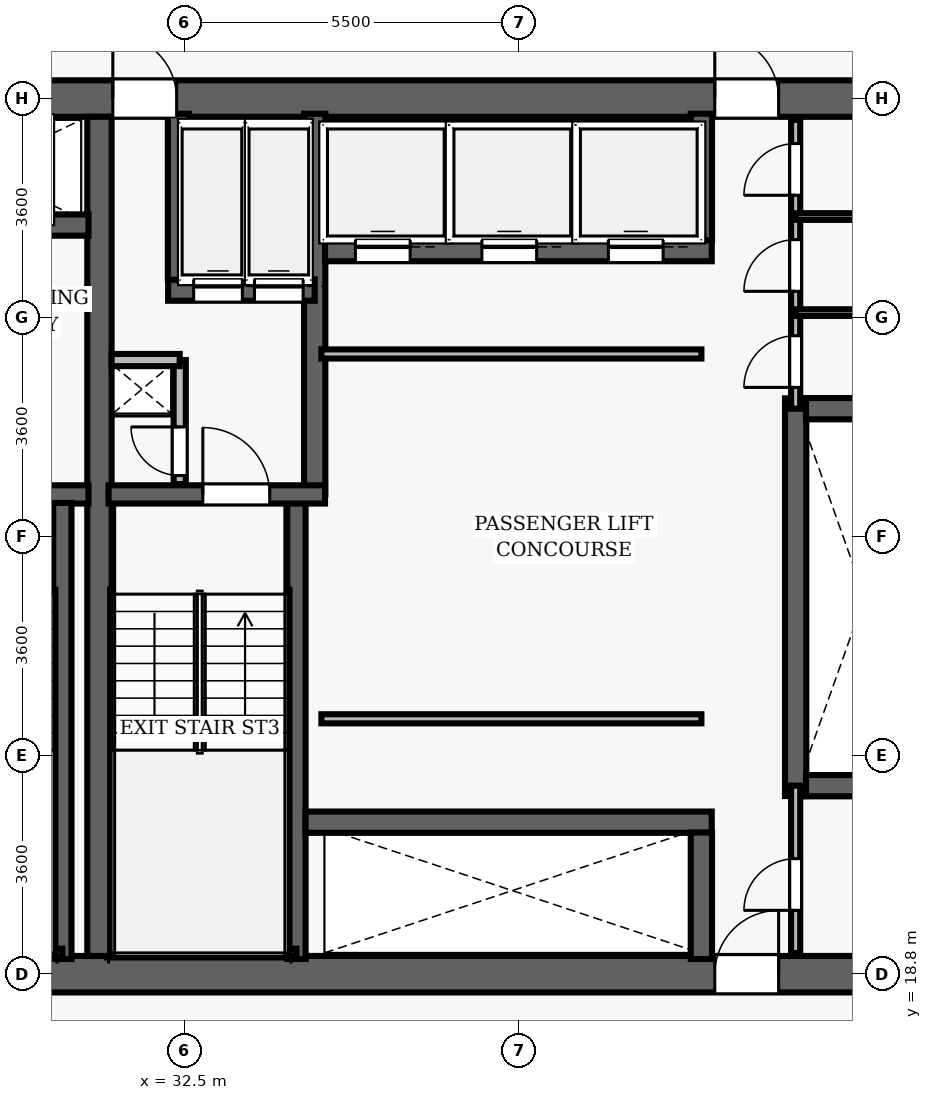
"""IFC4 building model, lengths in metres.
Left out: names, types, materials, properties, quantities, classifications, styles, units other than length and angle.
Written with IfcOpenShell. Run it as: python <this file> out.ifc"""

import sys

from ifc_helpers import new_model, si_unit, direction, frame, frame_2d, origin, place, context, subcontext, project, spatial, rectangle, extrude, element, fill, save


model = new_model("IFC4")
c1 = context("Model", 3, precision=1e-05, world=origin(), true_north=direction((0.0, 1.0)))
c2 = subcontext(c1, "Body", "Model", "MODEL_VIEW")
j1 = project(units=[si_unit("LENGTHUNIT", "METRE"), si_unit("PLANEANGLEUNIT", "RADIAN")], contexts=[c1])
p1 = place(None, origin())
s1 = spatial("IfcSite", under=j1, at=p1, CompositionType="ELEMENT")
p2 = place(p1, origin())
s2 = spatial("IfcBuilding", under=s1, at=p2, CompositionType="ELEMENT")
p3 = place(p2, frame((0.0, 0.0, 55.4)))
s3 = spatial("IfcBuildingStorey", under=s2, at=p3, CompositionType="ELEMENT", Elevation=55.4)
p4 = place(p3, frame((26.7, 18.8, 0.0), z_axis=(0.0, 0.0, 1.0), x_axis=(1.0, 0.0, 0.0)))
e1 = element("IfcWall", 1, at=p4, inside=s3, PredefinedType="SHEAR", context=c2, shape_type="SweptSolid", body=[
    extrude(rectangle(XDim=22.6, YDim=0.6, at=frame_2d((11.3, 0.0))), origin(), (0.0, 0.0, 1.0), 3.5),
])
p5 = place(p4, frame((14.52, 0.0, 0.0)))
e2 = element("IfcOpeningElement", 2, at=p5, cuts=e1, PredefinedType="OPENING", context=c2, shape_type="SweptSolid", body=[
    extrude(rectangle(XDim=1.05, YDim=2.15, at=frame_2d((0.525, 1.075))), frame((0.0, 0.31, 0.0), z_axis=(0.0, -1.0, 0.0), x_axis=(1.0, 0.0, 0.0)), (0.0, 0.0, 1.0), 0.62),
])
p6 = place(p3, frame((26.7, 33.2, 0.0), z_axis=(0.0, 0.0, 1.0), x_axis=(1.0, 0.0, 0.0)))
e3 = element("IfcWall", 3, at=p6, inside=s3, PredefinedType="SHEAR", context=c2, shape_type="SweptSolid", body=[
    extrude(rectangle(XDim=22.6, YDim=0.6, at=frame_2d((11.3, 0.0))), origin(), (0.0, 0.0, 1.0), 3.5),
])
p7 = place(p6, frame((4.62, 0.0, 0.0)))
e4 = element("IfcOpeningElement", 4, at=p7, cuts=e3, PredefinedType="OPENING", context=c2, shape_type="SweptSolid", body=[
    extrude(rectangle(XDim=1.05, YDim=2.15, at=frame_2d((0.525, 1.075))), frame((0.0, 0.31, 0.0), z_axis=(0.0, -1.0, 0.0), x_axis=(1.0, 0.0, 0.0)), (0.0, 0.0, 1.0), 0.62),
])
p8 = place(p6, frame((14.52, 0.0, 0.0)))
e5 = element("IfcOpeningElement", 5, at=p8, cuts=e3, PredefinedType="OPENING", context=c2, shape_type="SweptSolid", body=[
    extrude(rectangle(XDim=1.05, YDim=2.15, at=frame_2d((0.525, 1.075))), frame((0.0, 0.31, 0.0), z_axis=(0.0, -1.0, 0.0), x_axis=(1.0, 0.0, 0.0)), (0.0, 0.0, 1.0), 0.62),
])
p9 = place(p3, frame((31.1, 19.1, 0.0), z_axis=(0.0, 0.0, 1.0), x_axis=(0.0, 1.0, 0.0)))
e6 = element("IfcWall", 6, at=p9, inside=s3, PredefinedType="SHEAR", context=c2, shape_type="SweptSolid", body=[
    extrude(rectangle(XDim=13.8, YDim=0.4, at=frame_2d((6.9, 0.0))), origin(), (0.0, 0.0, 1.0), 3.5),
])
p10 = place(p3, frame((27.25, 26.69, 0.0), z_axis=(0.0, 0.0, 1.0), x_axis=(1.0, 0.0, 0.0)))
e7 = element("IfcWall", 7, at=p10, inside=s3, PredefinedType="SHEAR", context=c2, shape_type="SweptSolid", body=[
    extrude(rectangle(XDim=3.67, YDim=0.3, at=frame_2d((1.835, 0.0))), origin(), (0.0, 0.0, 1.0), 3.5),
])
p11 = place(p10, frame((1.05, 0.0, 0.0)))
e8 = element("IfcOpeningElement", 8, at=p11, cuts=e7, PredefinedType="OPENING", context=c2, shape_type="SweptSolid", body=[
    extrude(rectangle(XDim=1.1, YDim=2.15, at=frame_2d((0.55, 1.075))), frame((0.0, 0.16, 0.0), z_axis=(0.0, -1.0, 0.0), x_axis=(1.0, 0.0, 0.0)), (0.0, 0.0, 1.0), 0.32),
])
p12 = place(p3, frame((30.49, 19.05, 0.0), z_axis=(0.0, 0.0, 1.0), x_axis=(0.0, 1.0, 0.0)))
e9 = element("IfcWall", 9, at=p12, inside=s3, PredefinedType="SHEAR", context=c2, shape_type="SweptSolid", body=[
    extrude(rectangle(XDim=7.5, YDim=0.3, at=frame_2d((3.75, 0.0))), origin(), (0.0, 0.0, 1.0), 3.5),
])
p13 = place(p3, frame((27.395, 19.16, 0.0), z_axis=(0.0, 0.0, 1.0), x_axis=(1.0, 0.0, 0.0)))
e10 = element("IfcWall", 10, at=p13, inside=s3, PredefinedType="SHEAR", context=c2, shape_type="SweptSolid", body=[
    extrude(rectangle(XDim=3.095, YDim=0.12, at=frame_2d((1.547, 0.0))), origin(), (0.0, 0.0, 1.0), 3.5),
])
p14 = place(p3, frame((27.25, 31.12, 0.0), z_axis=(0.0, 0.0, 1.0), x_axis=(1.0, 0.0, 0.0)))
e11 = element("IfcWall", 11, at=p14, inside=s3, PredefinedType="SHEAR", context=c2, shape_type="SweptSolid", body=[
    extrude(rectangle(XDim=3.67, YDim=0.35, at=frame_2d((1.835, 0.0))), origin(), (0.0, 0.0, 1.0), 2.6),
])
p15 = place(p14, frame((1.25, 0.0, 0.0)))
e12 = element("IfcOpeningElement", 12, at=p15, cuts=e11, PredefinedType="OPENING", context=c2, shape_type="SweptSolid", body=[
    extrude(rectangle(XDim=1.1, YDim=2.15, at=frame_2d((0.55, 1.075))), frame((0.0, 0.185, 0.0), z_axis=(0.0, -1.0, 0.0), x_axis=(1.0, 0.0, 0.0)), (0.0, 0.0, 1.0), 0.37),
])
p16 = place(p3, frame((34.34, 19.05, 0.0), z_axis=(0.0, 0.0, 1.0), x_axis=(0.0, 1.0, 0.0)))
e13 = element("IfcWall", 13, at=p16, inside=s3, PredefinedType="SHEAR", context=c2, shape_type="SweptSolid", body=[
    extrude(rectangle(XDim=7.5, YDim=0.3, at=frame_2d((3.75, 0.0))), origin(), (0.0, 0.0, 1.0), 3.5),
])
p17 = place(p3, frame((34.64, 26.69, 0.0), z_axis=(0.0, 0.0, 1.0), x_axis=(0.0, 1.0, 0.0)))
e14 = element("IfcWall", 14, at=p17, inside=s3, PredefinedType="SHEAR", context=c2, shape_type="SweptSolid", body=[
    extrude(rectangle(XDim=6.26, YDim=0.35, at=frame_2d((3.13, 0.0))), origin(), (0.0, 0.0, 1.0), 3.5),
])
p18 = place(p3, frame((31.25, 26.69, 0.0), z_axis=(0.0, 0.0, 1.0), x_axis=(1.0, 0.0, 0.0)))
e15 = element("IfcWall", 15, at=p18, inside=s3, PredefinedType="SHEAR", context=c2, shape_type="SweptSolid", body=[
    extrude(rectangle(XDim=3.56, YDim=0.3, at=frame_2d((1.78, 0.0))), origin(), (0.0, 0.0, 1.0), 3.5),
])
p19 = place(p18, frame((1.55, 0.0, 0.0)))
e16 = element("IfcOpeningElement", 16, at=p19, cuts=e15, PredefinedType="OPENING", context=c2, shape_type="SweptSolid", body=[
    extrude(rectangle(XDim=1.1, YDim=2.15, at=frame_2d((0.55, 1.075))), frame((0.0, 0.16, 0.0), z_axis=(0.0, -1.0, 0.0), x_axis=(1.0, 0.0, 0.0)), (0.0, 0.0, 1.0), 0.32),
])
p20 = place(p3, frame((31.3, 19.16, 0.0), z_axis=(0.0, 0.0, 1.0), x_axis=(1.0, 0.0, 0.0)))
e17 = element("IfcWall", 17, at=p20, inside=s3, PredefinedType="SHEAR", context=c2, shape_type="SweptSolid", body=[
    extrude(rectangle(XDim=3.04, YDim=0.12, at=frame_2d((1.52, 0.0))), origin(), (0.0, 0.0, 1.0), 3.5),
])
p21 = place(p3, frame((32.23, 30.05, 0.0), z_axis=(0.0, 0.0, 1.0), x_axis=(1.0, 0.0, 0.0)))
e18 = element("IfcWall", 18, at=p21, inside=s3, PredefinedType="SHEAR", context=c2, shape_type="SweptSolid", body=[
    extrude(rectangle(XDim=2.41, YDim=0.35, at=frame_2d((1.205, 0.0))), origin(), (0.0, 0.0, 1.0), 2.6),
])
p22 = place(p21, frame((0.42, 0.0, 0.0)))
e19 = element("IfcOpeningElement", 19, at=p22, cuts=e18, PredefinedType="OPENING", context=c2, shape_type="SweptSolid", body=[
    extrude(rectangle(XDim=0.8, YDim=2.15, at=frame_2d((0.4, 1.075))), frame((0.0, 0.185, 0.0), z_axis=(0.0, -1.0, 0.0), x_axis=(1.0, 0.0, 0.0)), (0.0, 0.0, 1.0), 0.37),
])
p23 = place(p21, frame((1.42, 0.0, 0.0)))
e20 = element("IfcOpeningElement", 20, at=p23, cuts=e18, PredefinedType="OPENING", context=c2, shape_type="SweptSolid", body=[
    extrude(rectangle(XDim=0.8, YDim=2.15, at=frame_2d((0.4, 1.075))), frame((0.0, 0.185, 0.0), z_axis=(0.0, -1.0, 0.0), x_axis=(1.0, 0.0, 0.0)), (0.0, 0.0, 1.0), 0.37),
])
p24 = place(p3, frame((32.4, 30.22, 0.0), z_axis=(0.0, 0.0, 1.0), x_axis=(0.0, 1.0, 0.0)))
e21 = element("IfcWall", 21, at=p24, inside=s3, PredefinedType="SHEAR", context=c2, shape_type="SweptSolid", body=[
    extrude(rectangle(XDim=2.73, YDim=0.35, at=frame_2d((1.365, 0.0))), origin(), (0.0, 0.0, 1.0), 2.6),
])
p25 = place(p3, frame((32.42, 26.86, 0.0), z_axis=(0.0, 0.0, 1.0), x_axis=(0.0, 1.0, 0.0)))
e22 = element("IfcWall", 22, at=p25, inside=s3, PredefinedType="PARTITIONING", context=c2, shape_type="SweptSolid", body=[
    extrude(rectangle(XDim=2.04, YDim=0.2, at=frame_2d((1.02, 0.0))), origin(), (0.0, 0.0, 1.0), 2.6),
])
p26 = place(p25, frame((0.14, 0.0, 0.0)))
e23 = element("IfcOpeningElement", 23, at=p26, cuts=e22, PredefinedType="OPENING", context=c2, shape_type="SweptSolid", body=[
    extrude(rectangle(XDim=0.8, YDim=2.05, at=frame_2d((0.4, 1.025))), frame((0.0, 0.11, 0.0), z_axis=(0.0, -1.0, 0.0), x_axis=(1.0, 0.0, 0.0)), (0.0, 0.0, 1.0), 0.22),
])
p27 = place(p3, frame((31.3, 28.9, 0.0), z_axis=(0.0, 0.0, 1.0), x_axis=(1.0, 0.0, 0.0)))
e24 = element("IfcWall", 24, at=p27, inside=s3, PredefinedType="PARTITIONING", context=c2, shape_type="SweptSolid", body=[
    extrude(rectangle(XDim=1.12, YDim=0.2, at=frame_2d((0.56, 0.0))), origin(), (0.0, 0.0, 1.0), 2.6),
])
p28 = place(p3, frame((42.55, 21.73, 0.0), z_axis=(0.0, 0.0, 1.0), x_axis=(0.0, 1.0, 0.0)))
e25 = element("IfcWall", 25, at=p28, inside=s3, PredefinedType="SHEAR", context=c2, shape_type="SweptSolid", body=[
    extrude(rectangle(XDim=6.54, YDim=0.35, at=frame_2d((3.27, 0.0))), origin(), (0.0, 0.0, 1.0), 2.6),
])
for number, where, z_axis, x_axis in (
    (26, (42.72, 21.9, 0.0), (0.0, 0.0, 1.0), (1.0, 0.0, 0.0)),
    (27, (42.72, 28.1, 0.0), (0.0, 0.0, 1.0), (1.0, 0.0, 0.0)),
):
    element("IfcWall", number, at=place(p3, frame(where, z_axis=z_axis, x_axis=x_axis)), inside=s3, PredefinedType="SHEAR", context=c2, shape_type="SweptSolid", body=[
        extrude(rectangle(XDim=2.03, YDim=0.35, at=frame_2d((1.015, 0.0))), origin(), (0.0, 0.0, 1.0), 2.6),
    ])
p29 = place(p3, frame((34.81, 30.7, 0.0), z_axis=(0.0, 0.0, 1.0), x_axis=(1.0, 0.0, 0.0)))
e28 = element("IfcWall", 28, at=p29, inside=s3, PredefinedType="SHEAR", context=c2, shape_type="SweptSolid", body=[
    extrude(rectangle(XDim=6.36, YDim=0.35, at=frame_2d((3.18, 0.0))), origin(), (0.0, 0.0, 1.0), 2.6),
])
p30 = place(p29, frame((0.5, 0.0, 0.0)))
e29 = element("IfcOpeningElement", 29, at=p30, cuts=e28, PredefinedType="OPENING", context=c2, shape_type="SweptSolid", body=[
    extrude(rectangle(XDim=0.9, YDim=2.15, at=frame_2d((0.45, 1.075))), frame((0.0, 0.185, 0.0), z_axis=(0.0, -1.0, 0.0), x_axis=(1.0, 0.0, 0.0)), (0.0, 0.0, 1.0), 0.37),
])
p31 = place(p29, frame((2.58, 0.0, 0.0)))
e30 = element("IfcOpeningElement", 30, at=p31, cuts=e28, PredefinedType="OPENING", context=c2, shape_type="SweptSolid", body=[
    extrude(rectangle(XDim=0.9, YDim=2.15, at=frame_2d((0.45, 1.075))), frame((0.0, 0.185, 0.0), z_axis=(0.0, -1.0, 0.0), x_axis=(1.0, 0.0, 0.0)), (0.0, 0.0, 1.0), 0.37),
])
p32 = place(p29, frame((4.66, 0.0, 0.0)))
e31 = element("IfcOpeningElement", 31, at=p32, cuts=e28, PredefinedType="OPENING", context=c2, shape_type="SweptSolid", body=[
    extrude(rectangle(XDim=0.9, YDim=2.15, at=frame_2d((0.45, 1.075))), frame((0.0, 0.185, 0.0), z_axis=(0.0, -1.0, 0.0), x_axis=(1.0, 0.0, 0.0)), (0.0, 0.0, 1.0), 0.37),
])
p33 = place(p3, frame((41.0, 30.87, 0.0), z_axis=(0.0, 0.0, 1.0), x_axis=(0.0, 1.0, 0.0)))
e32 = element("IfcWall", 32, at=p33, inside=s3, PredefinedType="SHEAR", context=c2, shape_type="SweptSolid", body=[
    extrude(rectangle(XDim=2.08, YDim=0.35, at=frame_2d((1.04, 0.0))), origin(), (0.0, 0.0, 1.0), 2.6),
])
p34 = place(p3, frame((34.49, 21.3, 0.0), z_axis=(0.0, 0.0, 1.0), x_axis=(1.0, 0.0, 0.0)))
e33 = element("IfcWall", 33, at=p34, inside=s3, PredefinedType="SHEAR", context=c2, shape_type="SweptSolid", body=[
    extrude(rectangle(XDim=6.68, YDim=0.35, at=frame_2d((3.34, 0.0))), origin(), (0.0, 0.0, 1.0), 2.6),
])
p35 = place(p3, frame((41.0, 19.05, 0.0), z_axis=(0.0, 0.0, 1.0), x_axis=(0.0, 1.0, 0.0)))
e34 = element("IfcWall", 34, at=p35, inside=s3, PredefinedType="SHEAR", context=c2, shape_type="SweptSolid", body=[
    extrude(rectangle(XDim=2.08, YDim=0.35, at=frame_2d((1.04, 0.0))), origin(), (0.0, 0.0, 1.0), 2.6),
])
for number, where, z_axis, x_axis in (
    (35, (34.75, 29.0, 0.0), (0.0, 0.0, 1.0), (1.0, 0.0, 0.0)),
    (36, (34.75, 23.0, 0.0), (0.0, 0.0, 1.0), (1.0, 0.0, 0.0)),
):
    element("IfcWall", number, at=place(p3, frame(where, z_axis=z_axis, x_axis=x_axis)), inside=s3, PredefinedType="PARTITIONING", context=c2, shape_type="SweptSolid", body=[
        extrude(rectangle(XDim=6.25, YDim=0.15, at=frame_2d((3.125, 0.0))), origin(), (0.0, 0.0, 1.0), 2.6),
    ])
p36 = place(p3, frame((42.55, 28.1, 0.0), z_axis=(0.0, 0.0, 1.0), x_axis=(0.0, 1.0, 0.0)))
e37 = element("IfcWall", 37, at=p36, inside=s3, PredefinedType="PARTITIONING", context=c2, shape_type="SweptSolid", body=[
    extrude(rectangle(XDim=4.75, YDim=0.15, at=frame_2d((2.375, 0.0))), origin(), (0.0, 0.0, 1.0), 2.6),
])
p37 = place(p36, frame((0.35, 0.0, 0.0)))
e38 = element("IfcOpeningElement", 38, at=p37, cuts=e37, PredefinedType="OPENING", context=c2, shape_type="SweptSolid", body=[
    extrude(rectangle(XDim=0.85, YDim=2.1, at=frame_2d((0.425, 1.05))), frame((0.0, 0.085, 0.0), z_axis=(0.0, -1.0, 0.0), x_axis=(1.0, 0.0, 0.0)), (0.0, 0.0, 1.0), 0.17),
])
p38 = place(p36, frame((1.93, 0.0, 0.0)))
e39 = element("IfcOpeningElement", 39, at=p38, cuts=e37, PredefinedType="OPENING", context=c2, shape_type="SweptSolid", body=[
    extrude(rectangle(XDim=0.85, YDim=2.1, at=frame_2d((0.425, 1.05))), frame((0.0, 0.085, 0.0), z_axis=(0.0, -1.0, 0.0), x_axis=(1.0, 0.0, 0.0)), (0.0, 0.0, 1.0), 0.17),
])
p39 = place(p36, frame((3.51, 0.0, 0.0)))
e40 = element("IfcOpeningElement", 40, at=p39, cuts=e37, PredefinedType="OPENING", context=c2, shape_type="SweptSolid", body=[
    extrude(rectangle(XDim=0.85, YDim=2.1, at=frame_2d((0.425, 1.05))), frame((0.0, 0.085, 0.0), z_axis=(0.0, -1.0, 0.0), x_axis=(1.0, 0.0, 0.0)), (0.0, 0.0, 1.0), 0.17),
])
for number, where, z_axis, x_axis in (
    (41, (42.55, 29.68, 0.0), (0.0, 0.0, 1.0), (1.0, 0.0, 0.0)),
    (42, (42.55, 31.26, 0.0), (0.0, 0.0, 1.0), (1.0, 0.0, 0.0)),
):
    element("IfcWall", number, at=place(p3, frame(where, z_axis=z_axis, x_axis=x_axis)), inside=s3, PredefinedType="PARTITIONING", context=c2, shape_type="SweptSolid", body=[
        extrude(rectangle(XDim=2.2, YDim=0.11, at=frame_2d((1.1, 0.0))), origin(), (0.0, 0.0, 1.0), 2.6),
    ])
p40 = place(p3, frame((42.55, 19.15, 0.0), z_axis=(0.0, 0.0, 1.0), x_axis=(0.0, 1.0, 0.0)))
e43 = element("IfcWall", 43, at=p40, inside=s3, PredefinedType="PARTITIONING", context=c2, shape_type="SweptSolid", body=[
    extrude(rectangle(XDim=2.75, YDim=0.15, at=frame_2d((1.375, 0.0))), origin(), (0.0, 0.0, 1.0), 2.6),
])
p41 = place(p40, frame((0.7, 0.0, 0.0)))
e44 = element("IfcOpeningElement", 44, at=p41, cuts=e43, PredefinedType="OPENING", context=c2, shape_type="SweptSolid", body=[
    extrude(rectangle(XDim=0.85, YDim=2.1, at=frame_2d((0.425, 1.05))), frame((0.0, 0.085, 0.0), z_axis=(0.0, -1.0, 0.0), x_axis=(1.0, 0.0, 0.0)), (0.0, 0.0, 1.0), 0.17),
])
p42 = place(p19, origin())
e45 = element("IfcDoor", 45, at=p42, inside=s3, OperationType="SINGLE_SWING_LEFT", PredefinedType="DOOR", context=c2, shape_type="SweptSolid", body=[
    extrude(rectangle(XDim=1.1, YDim=2.15, at=frame_2d((0.55, 1.075))), frame((0.0, 0.025, 0.0), z_axis=(0.0, -1.0, 0.0), x_axis=(1.0, 0.0, 0.0)), (0.0, 0.0, 1.0), 0.05),
])
fill(e16, e45)
p43 = place(p26, origin())
e46 = element("IfcDoor", 46, at=p43, inside=s3, OperationType="SINGLE_SWING_RIGHT", PredefinedType="DOOR", context=c2, shape_type="SweptSolid", body=[
    extrude(rectangle(XDim=0.8, YDim=2.05, at=frame_2d((0.4, 1.025))), frame((0.0, 0.025, 0.0), z_axis=(0.0, -1.0, 0.0), x_axis=(1.0, 0.0, 0.0)), (0.0, 0.0, 1.0), 0.05),
])
fill(e23, e46)
p44 = place(p7, origin())
e47 = element("IfcDoor", 47, at=p44, inside=s3, OperationType="SINGLE_SWING_LEFT", PredefinedType="DOOR", context=c2, shape_type="SweptSolid", body=[
    extrude(rectangle(XDim=1.05, YDim=2.15, at=frame_2d((0.525, 1.075))), frame((0.0, 0.025, 0.0), z_axis=(0.0, -1.0, 0.0), x_axis=(1.0, 0.0, 0.0)), (0.0, 0.0, 1.0), 0.05),
])
fill(e4, e47)
p45 = place(p8, origin())
e48 = element("IfcDoor", 48, at=p45, inside=s3, OperationType="SINGLE_SWING_LEFT", PredefinedType="DOOR", context=c2, shape_type="SweptSolid", body=[
    extrude(rectangle(XDim=1.05, YDim=2.15, at=frame_2d((0.525, 1.075))), frame((0.0, 0.025, 0.0), z_axis=(0.0, -1.0, 0.0), x_axis=(1.0, 0.0, 0.0)), (0.0, 0.0, 1.0), 0.05),
])
fill(e5, e48)
p46 = place(p5, origin())
e49 = element("IfcDoor", 49, at=p46, inside=s3, OperationType="SINGLE_SWING_RIGHT", PredefinedType="DOOR", context=c2, shape_type="SweptSolid", body=[
    extrude(rectangle(XDim=1.05, YDim=2.15, at=frame_2d((0.525, 1.075))), frame((0.0, 0.025, 0.0), z_axis=(0.0, -1.0, 0.0), x_axis=(1.0, 0.0, 0.0)), (0.0, 0.0, 1.0), 0.05),
])
fill(e2, e49)
p47 = place(p37, origin())
e50 = element("IfcDoor", 50, at=p47, inside=s3, OperationType="SINGLE_SWING_LEFT", PredefinedType="DOOR", context=c2, shape_type="SweptSolid", body=[
    extrude(rectangle(XDim=0.85, YDim=2.1, at=frame_2d((0.425, 1.05))), frame((0.0, 0.025, 0.0), z_axis=(0.0, -1.0, 0.0), x_axis=(1.0, 0.0, 0.0)), (0.0, 0.0, 1.0), 0.05),
])
fill(e38, e50)
p48 = place(p38, origin())
e51 = element("IfcDoor", 51, at=p48, inside=s3, OperationType="SINGLE_SWING_LEFT", PredefinedType="DOOR", context=c2, shape_type="SweptSolid", body=[
    extrude(rectangle(XDim=0.85, YDim=2.1, at=frame_2d((0.425, 1.05))), frame((0.0, 0.025, 0.0), z_axis=(0.0, -1.0, 0.0), x_axis=(1.0, 0.0, 0.0)), (0.0, 0.0, 1.0), 0.05),
])
fill(e39, e51)
p49 = place(p39, origin())
e52 = element("IfcDoor", 52, at=p49, inside=s3, OperationType="SINGLE_SWING_LEFT", PredefinedType="DOOR", context=c2, shape_type="SweptSolid", body=[
    extrude(rectangle(XDim=0.85, YDim=2.1, at=frame_2d((0.425, 1.05))), frame((0.0, 0.025, 0.0), z_axis=(0.0, -1.0, 0.0), x_axis=(1.0, 0.0, 0.0)), (0.0, 0.0, 1.0), 0.05),
])
fill(e40, e52)
p50 = place(p41, origin())
e53 = element("IfcDoor", 53, at=p50, inside=s3, OperationType="SINGLE_SWING_LEFT", PredefinedType="DOOR", context=c2, shape_type="SweptSolid", body=[
    extrude(rectangle(XDim=0.85, YDim=2.1, at=frame_2d((0.425, 1.05))), frame((0.0, 0.025, 0.0), z_axis=(0.0, -1.0, 0.0), x_axis=(1.0, 0.0, 0.0)), (0.0, 0.0, 1.0), 0.05),
])
fill(e44, e53)
p51 = place(p30, origin())
e54 = element("IfcDoor", 54, at=p51, inside=s3, OperationType="SLIDING_TO_LEFT", PredefinedType="DOOR", context=c2, shape_type="SweptSolid", body=[
    extrude(rectangle(XDim=0.9, YDim=2.15, at=frame_2d((0.45, 1.075))), frame((0.0, 0.025, 0.0), z_axis=(0.0, -1.0, 0.0), x_axis=(1.0, 0.0, 0.0)), (0.0, 0.0, 1.0), 0.05),
])
fill(e29, e54)
p52 = place(p31, origin())
e55 = element("IfcDoor", 55, at=p52, inside=s3, OperationType="SLIDING_TO_LEFT", PredefinedType="DOOR", context=c2, shape_type="SweptSolid", body=[
    extrude(rectangle(XDim=0.9, YDim=2.15, at=frame_2d((0.45, 1.075))), frame((0.0, 0.025, 0.0), z_axis=(0.0, -1.0, 0.0), x_axis=(1.0, 0.0, 0.0)), (0.0, 0.0, 1.0), 0.05),
])
fill(e30, e55)
p53 = place(p32, origin())
e56 = element("IfcDoor", 56, at=p53, inside=s3, OperationType="SLIDING_TO_LEFT", PredefinedType="DOOR", context=c2, shape_type="SweptSolid", body=[
    extrude(rectangle(XDim=0.9, YDim=2.15, at=frame_2d((0.45, 1.075))), frame((0.0, 0.025, 0.0), z_axis=(0.0, -1.0, 0.0), x_axis=(1.0, 0.0, 0.0)), (0.0, 0.0, 1.0), 0.05),
])
fill(e31, e56)
p54 = place(p22, origin())
e57 = element("IfcDoor", 57, at=p54, inside=s3, OperationType="SLIDING_TO_LEFT", PredefinedType="DOOR", context=c2, shape_type="SweptSolid", body=[
    extrude(rectangle(XDim=0.8, YDim=2.15, at=frame_2d((0.4, 1.075))), frame((0.0, 0.025, 0.0), z_axis=(0.0, -1.0, 0.0), x_axis=(1.0, 0.0, 0.0)), (0.0, 0.0, 1.0), 0.05),
])
fill(e19, e57)
p55 = place(p23, origin())
e58 = element("IfcDoor", 58, at=p55, inside=s3, OperationType="SLIDING_TO_LEFT", PredefinedType="DOOR", context=c2, shape_type="SweptSolid", body=[
    extrude(rectangle(XDim=0.8, YDim=2.15, at=frame_2d((0.4, 1.075))), frame((0.0, 0.025, 0.0), z_axis=(0.0, -1.0, 0.0), x_axis=(1.0, 0.0, 0.0)), (0.0, 0.0, 1.0), 0.05),
])
fill(e20, e58)
save(model, sys.argv[1])
